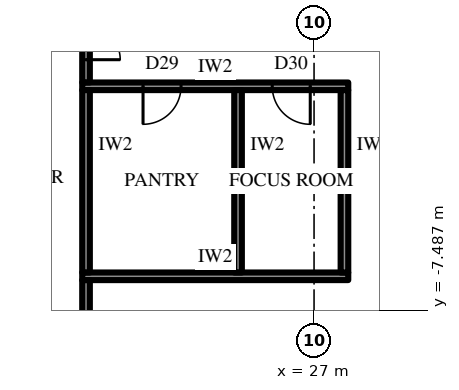
"""IFC4 building model, lengths in metres.
Left out: names, types, materials, properties, quantities, classifications, styles, units other than length and angle.
Written with IfcOpenShell. Run it as: python <this file> out.ifc"""

import sys

from ifc_helpers import new_model, si_unit, direction, frame, frame_2d, origin, place, context, subcontext, project, spatial, rectangle, extrude, element, fill, save


model = new_model("IFC4")
c1 = context("Model", 3, precision=1e-05, world=origin(), true_north=direction((0.0, 1.0)))
c2 = subcontext(c1, "Body", "Model", "MODEL_VIEW")
j1 = project(units=[si_unit("LENGTHUNIT", "METRE"), si_unit("PLANEANGLEUNIT", "RADIAN")], contexts=[c1])
p1 = place(None, origin())
s1 = spatial("IfcSite", under=j1, at=p1, CompositionType="ELEMENT")
p2 = place(p1, origin())
s2 = spatial("IfcBuilding", under=s1, at=p2, CompositionType="ELEMENT")
p3 = place(p2, frame((0.0, 0.0, 90.7)))
s3 = spatial("IfcBuildingStorey", under=s2, at=p3, CompositionType="ELEMENT", Elevation=90.7)
p4 = place(p3, frame((21.232, -30.925, 0.0), z_axis=(0.0, 0.0, 1.0), x_axis=(0.499999163675, 0.866025886636, 0.0)))
e1 = element("IfcWall", 1, at=p4, inside=s3, PredefinedType="SOLIDWALL", context=c2, shape_type="SweptSolid", body=[
    extrude(rectangle(XDim=32.332, YDim=0.3, at=frame_2d((16.166, 0.0))), origin(), (0.0, 0.0, 1.0), 2.7),
])
p5 = place(p4, frame((1.319, 0.0, 0.6)))
e2 = element("IfcOpeningElement", 2, at=p5, cuts=e1, PredefinedType="OPENING", context=c2, shape_type="SweptSolid", body=[
    extrude(rectangle(XDim=2.75, YDim=1.85, at=frame_2d((1.375, 0.925))), frame((0.0, 0.16, 0.0), z_axis=(0.0, -1.0, 0.0), x_axis=(1.0, 0.0, 0.0)), (0.0, 0.0, 1.0), 0.32),
])
p6 = place(p4, frame((6.708, 0.0, 0.6)))
e3 = element("IfcOpeningElement", 3, at=p6, cuts=e1, PredefinedType="OPENING", context=c2, shape_type="SweptSolid", body=[
    extrude(rectangle(XDim=2.75, YDim=1.85, at=frame_2d((1.375, 0.925))), frame((0.0, 0.16, 0.0), z_axis=(0.0, -1.0, 0.0), x_axis=(1.0, 0.0, 0.0)), (0.0, 0.0, 1.0), 0.32),
])
p7 = place(p4, frame((12.872, 0.0, 0.0)))
e4 = element("IfcOpeningElement", 4, at=p7, cuts=e1, PredefinedType="OPENING", context=c2, shape_type="SweptSolid", body=[
    extrude(rectangle(XDim=1.2, YDim=2.4, at=frame_2d((0.6, 1.2))), frame((0.0, 0.16, 0.0), z_axis=(0.0, -1.0, 0.0), x_axis=(1.0, 0.0, 0.0)), (0.0, 0.0, 1.0), 0.32),
])
p8 = place(p4, frame((17.485, 0.0, 0.6)))
e5 = element("IfcOpeningElement", 5, at=p8, cuts=e1, PredefinedType="OPENING", context=c2, shape_type="SweptSolid", body=[
    extrude(rectangle(XDim=2.75, YDim=1.85, at=frame_2d((1.375, 0.925))), frame((0.0, 0.16, 0.0), z_axis=(0.0, -1.0, 0.0), x_axis=(1.0, 0.0, 0.0)), (0.0, 0.0, 1.0), 0.32),
])
p9 = place(p4, frame((22.874, 0.0, 0.6)))
e6 = element("IfcOpeningElement", 6, at=p9, cuts=e1, PredefinedType="OPENING", context=c2, shape_type="SweptSolid", body=[
    extrude(rectangle(XDim=2.75, YDim=1.85, at=frame_2d((1.375, 0.925))), frame((0.0, 0.16, 0.0), z_axis=(0.0, -1.0, 0.0), x_axis=(1.0, 0.0, 0.0)), (0.0, 0.0, 1.0), 0.32),
])
p10 = place(p4, frame((28.262, 0.0, 0.6)))
e7 = element("IfcOpeningElement", 7, at=p10, cuts=e1, PredefinedType="OPENING", context=c2, shape_type="SweptSolid", body=[
    extrude(rectangle(XDim=2.75, YDim=1.85, at=frame_2d((1.375, 0.925))), frame((0.0, 0.16, 0.0), z_axis=(0.0, -1.0, 0.0), x_axis=(1.0, 0.0, 0.0)), (0.0, 0.0, 1.0), 0.32),
])
p11 = place(p3, frame((20.9, -1.6, 0.0), z_axis=(0.0, 0.0, 1.0), x_axis=(1.0, 0.0, 0.0)))
e8 = element("IfcWall", 8, at=p11, inside=s3, PredefinedType="PARTITIONING", context=c2, shape_type="SweptSolid", body=[
    extrude(rectangle(XDim=7.0, YDim=0.2, at=frame_2d((3.5, 0.0))), origin(), (0.0, 0.0, 1.0), 4.0),
])
p12 = place(p11, frame((1.6, 0.0, 0.0)))
e9 = element("IfcOpeningElement", 9, at=p12, cuts=e8, PredefinedType="OPENING", context=c2, shape_type="SweptSolid", body=[
    extrude(rectangle(XDim=1.0, YDim=2.2, at=frame_2d((0.5, 1.1))), frame((0.0, 0.11, 0.0), z_axis=(0.0, -1.0, 0.0), x_axis=(1.0, 0.0, 0.0)), (0.0, 0.0, 1.0), 0.22),
])
p13 = place(p11, frame((5.0, 0.0, 0.0)))
e10 = element("IfcOpeningElement", 10, at=p13, cuts=e8, PredefinedType="OPENING", context=c2, shape_type="SweptSolid", body=[
    extrude(rectangle(XDim=1.0, YDim=2.2, at=frame_2d((0.5, 1.1))), frame((0.0, 0.11, 0.0), z_axis=(0.0, -1.0, 0.0), x_axis=(1.0, 0.0, 0.0)), (0.0, 0.0, 1.0), 0.22),
])
p14 = place(p3, frame((20.9, -6.6, 0.0), z_axis=(0.0, 0.0, 1.0), x_axis=(1.0, 0.0, 0.0)))
e11 = element("IfcWall", 11, at=p14, inside=s3, PredefinedType="PARTITIONING", context=c2, shape_type="SweptSolid", body=[
    extrude(rectangle(XDim=7.0, YDim=0.2, at=frame_2d((3.5, 0.0))), origin(), (0.0, 0.0, 1.0), 4.0),
])
for number, where, z_axis, x_axis in (
    (12, (21.0, -1.7, 0.0), (0.0, 0.0, 1.0), (0.0, -1.0, 0.0)),
    (13, (25.0, -1.7, 0.0), (0.0, 0.0, 1.0), (0.0, -1.0, 0.0)),
    (14, (27.8, -1.7, 0.0), (0.0, 0.0, 1.0), (0.0, -1.0, 0.0)),
):
    element("IfcWall", number, at=place(p3, frame(where, z_axis=z_axis, x_axis=x_axis)), inside=s3, PredefinedType="PARTITIONING", context=c2, shape_type="SweptSolid", body=[
        extrude(rectangle(XDim=4.8, YDim=0.2, at=frame_2d((2.4, 0.0))), origin(), (0.0, 0.0, 1.0), 4.0),
    ])
p15 = place(p3, frame((21.0, -6.701, 0.0), z_axis=(0.0, 0.0, 1.0), x_axis=(0.0, -1.0, 0.0)))
e15 = element("IfcWall", 15, at=p15, inside=s3, PredefinedType="PARTITIONING", context=c2, shape_type="SweptSolid", body=[
    extrude(rectangle(XDim=6.399, YDim=0.2, at=frame_2d((3.2, 0.0))), origin(), (0.0, 0.0, 1.0), 4.0),
])
p16 = place(p3, frame((21.0, 13.1, 0.0), z_axis=(0.0, 0.0, 1.0), x_axis=(0.0, -1.0, 0.0)))
e16 = element("IfcWall", 16, at=p16, inside=s3, PredefinedType="PARTITIONING", context=c2, shape_type="SweptSolid", body=[
    extrude(rectangle(XDim=14.599, YDim=0.2, at=frame_2d((7.3, 0.0))), origin(), (0.0, 0.0, 1.0), 4.0),
])
p17 = place(p16, frame((12.2, 0.0, 0.0)))
e17 = element("IfcOpeningElement", 17, at=p17, cuts=e16, PredefinedType="OPENING", context=c2, shape_type="SweptSolid", body=[
    extrude(rectangle(XDim=1.8, YDim=2.4, at=frame_2d((0.9, 1.2))), frame((0.0, 0.11, 0.0), z_axis=(0.0, -1.0, 0.0), x_axis=(1.0, 0.0, 0.0)), (0.0, 0.0, 1.0), 0.22),
])
p18 = place(p12, frame((1.0, 0.0, 0.0), z_axis=(0.0, 0.0, 1.0), x_axis=(-1.0, 0.0, 0.0)))
e18 = element("IfcDoor", 18, at=p18, inside=s3, OperationType="SINGLE_SWING_LEFT", PredefinedType="DOOR", context=c2, shape_type="SweptSolid", body=[
    extrude(rectangle(XDim=1.0, YDim=2.2, at=frame_2d((0.5, 1.1))), frame((0.0, 0.025, 0.0), z_axis=(0.0, -1.0, 0.0), x_axis=(1.0, 0.0, 0.0)), (0.0, 0.0, 1.0), 0.05),
])
fill(e9, e18)
p19 = place(p13, frame((1.0, 0.0, 0.0), z_axis=(0.0, 0.0, 1.0), x_axis=(-1.0, 0.0, 0.0)))
e19 = element("IfcDoor", 19, at=p19, inside=s3, OperationType="SINGLE_SWING_RIGHT", PredefinedType="DOOR", context=c2, shape_type="SweptSolid", body=[
    extrude(rectangle(XDim=1.0, YDim=2.2, at=frame_2d((0.5, 1.1))), frame((0.0, 0.025, 0.0), z_axis=(0.0, -1.0, 0.0), x_axis=(1.0, 0.0, 0.0)), (0.0, 0.0, 1.0), 0.05),
])
fill(e10, e19)
p20 = place(p17, origin())
e20 = element("IfcDoor", 20, at=p20, inside=s3, OperationType="DOUBLE_DOOR_SINGLE_SWING", PredefinedType="DOOR", context=c2, shape_type="SweptSolid", body=[
    extrude(rectangle(XDim=1.8, YDim=2.4, at=frame_2d((0.9, 1.2))), frame((0.0, 0.025, 0.0), z_axis=(0.0, -1.0, 0.0), x_axis=(1.0, 0.0, 0.0)), (0.0, 0.0, 1.0), 0.05),
])
fill(e17, e20)
save(model, sys.argv[1])
